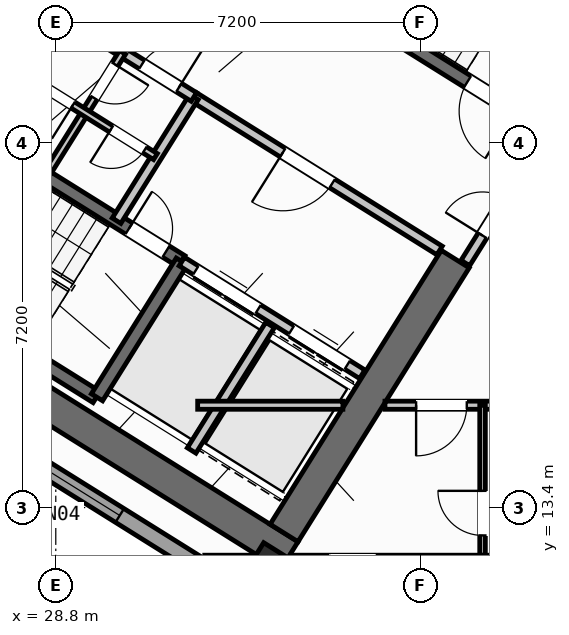
"""IFC4 building model, lengths in metres.
Left out: names, types, materials, properties, quantities, classifications, styles, units other than length and angle.
Written with IfcOpenShell. Run it as: python <this file> out.ifc"""

import sys

from ifc_helpers import new_model, si_unit, direction, frame, frame_2d, origin, origin_2d, place, context, subcontext, project, spatial, rectangle, hollow_rectangle, extrude, source, transform, mapped, element, fill, save


model = new_model("IFC4")
c1 = context("Model", 3, precision=1e-05, world=origin(), true_north=direction((0.0, 1.0)))
c2 = subcontext(c1, "Body", "Model", "MODEL_VIEW")
j1 = project(units=[si_unit("LENGTHUNIT", "METRE"), si_unit("PLANEANGLEUNIT", "RADIAN")], contexts=[c1])
p1 = place(None, origin())
s1 = spatial("IfcSite", under=j1, at=p1, CompositionType="ELEMENT")
p2 = place(p1, origin())
s2 = spatial("IfcBuilding", under=s1, at=p2, CompositionType="ELEMENT")
p3 = place(p2, frame((0.0, 0.0, 97.2)))
s3 = spatial("IfcBuildingStorey", under=s2, at=p3, CompositionType="ELEMENT", Elevation=97.2)
p4 = place(p3, frame((33.409, 12.45, 0.0), z_axis=(0.0, 0.0, 1.0), x_axis=(-0.848051132073, 0.529914405721, 0.0)))
e1 = element("IfcWall", 1, at=p4, inside=s3, PredefinedType="SHEAR", context=c2, shape_type="SweptSolid", body=[
    extrude(rectangle(XDim=13.24, YDim=0.65, at=frame_2d((6.62, 0.0))), origin(), (0.0, 0.0, 1.0), 3.32),
])
p5 = place(p3, frame((36.683, 18.304, 0.0), z_axis=(0.0, 0.0, 1.0), x_axis=(-0.529899109053, -0.848060690178, 0.0)))
e2 = element("IfcWall", 2, at=p5, inside=s3, PredefinedType="SHEAR", context=c2, shape_type="SweptSolid", body=[
    extrude(rectangle(XDim=6.375, YDim=0.65, at=frame_2d((3.188, 0.0))), origin(), (0.0, 0.0, 1.0), 3.32),
])
m1 = source(origin(), c2, "Body", "SweptSolid", [
    extrude(hollow_rectangle(XDim=0.9, YDim=0.9, WallThickness=0.036, at=origin_2d()), origin(), (0.0, 0.0, 1.0), 3.6),
])
p6 = place(p3, frame((33.046, 12.087, 0.0), z_axis=(0.0, 0.0, 1.0), x_axis=(-0.848048096156, 0.529919264233, 0.0)))
e3 = element("IfcColumn", 3, at=p6, inside=s3, PredefinedType="COLUMN", context=c2, shape_type="MappedRepresentation", body=[
    mapped(m1, transform((0.0, 0.0, 0.0), scale=1.0)),
])
p7 = place(p3, frame((31.76, 12.183, 0.0), z_axis=(0.0, 0.0, 1.0), x_axis=(-0.848047074256, 0.529920899612, 0.0)))
e4 = element("IfcWall", 4, at=p7, inside=s3, PredefinedType="STANDARD", context=c2, shape_type="SweptSolid", body=[
    extrude(rectangle(XDim=30.652, YDim=0.32, at=frame_2d((15.326, 0.0))), origin(), (0.0, 0.0, 1.0), 3.32),
])
p8 = place(p7, frame((15.153, 0.0, 0.0)))
e5 = element("IfcOpeningElement", 5, at=p8, cuts=e4, PredefinedType="OPENING", context=c2, shape_type="SweptSolid", body=[
    extrude(rectangle(XDim=1.2, YDim=2.15, at=frame_2d((0.6, 1.075))), frame((0.0, 0.17, 0.0), z_axis=(0.0, -1.0, 0.0), x_axis=(1.0, 0.0, 0.0)), (0.0, 0.0, 1.0), 0.34),
])
p9 = place(p7, frame((2.002, 0.0, 0.8)))
e6 = element("IfcOpeningElement", 6, at=p9, cuts=e4, PredefinedType="OPENING", context=c2, shape_type="SweptSolid", body=[
    extrude(rectangle(XDim=2.1, YDim=1.55, at=frame_2d((1.05, 0.775))), frame((0.0, 0.17, 0.0), z_axis=(0.0, -1.0, 0.0), x_axis=(1.0, 0.0, 0.0)), (0.0, 0.0, 1.0), 0.34),
])
p10 = place(p7, frame((7.206, 0.0, 0.8)))
e7 = element("IfcOpeningElement", 7, at=p10, cuts=e4, PredefinedType="OPENING", context=c2, shape_type="SweptSolid", body=[
    extrude(rectangle(XDim=2.1, YDim=1.55, at=frame_2d((1.05, 0.775))), frame((0.0, 0.17, 0.0), z_axis=(0.0, -1.0, 0.0), x_axis=(1.0, 0.0, 0.0)), (0.0, 0.0, 1.0), 0.34),
])
p11 = place(p7, frame((12.648, 0.0, 1.0)))
e8 = element("IfcOpeningElement", 8, at=p11, cuts=e4, PredefinedType="OPENING", context=c2, shape_type="SweptSolid", body=[
    extrude(rectangle(XDim=0.9, YDim=1.25, at=frame_2d((0.45, 0.625))), frame((0.0, 0.17, 0.0), z_axis=(0.0, -1.0, 0.0), x_axis=(1.0, 0.0, 0.0)), (0.0, 0.0, 1.0), 0.34),
])
p12 = place(p7, frame((27.974, 0.0, 0.95)))
e9 = element("IfcOpeningElement", 9, at=p12, cuts=e4, PredefinedType="OPENING", context=c2, shape_type="SweptSolid", body=[
    extrude(rectangle(XDim=1.2, YDim=1.4, at=frame_2d((0.6, 0.7))), frame((0.0, 0.17, 0.0), z_axis=(0.0, -1.0, 0.0), x_axis=(1.0, 0.0, 0.0)), (0.0, 0.0, 1.0), 0.34),
])
p13 = place(p7, frame((18.347, 0.0, 1.0)))
e10 = element("IfcOpeningElement", 10, at=p13, cuts=e4, PredefinedType="OPENING", context=c2, shape_type="SweptSolid", body=[
    extrude(rectangle(XDim=0.9, YDim=1.25, at=frame_2d((0.45, 0.625))), frame((0.0, 0.17, 0.0), z_axis=(0.0, -1.0, 0.0), x_axis=(1.0, 0.0, 0.0)), (0.0, 0.0, 1.0), 0.34),
])
p14 = place(p7, frame((20.931, 0.0, 1.0)))
e11 = element("IfcOpeningElement", 11, at=p14, cuts=e4, PredefinedType="OPENING", context=c2, shape_type="SweptSolid", body=[
    extrude(rectangle(XDim=0.65, YDim=1.15, at=frame_2d((0.325, 0.575))), frame((0.0, 0.17, 0.0), z_axis=(0.0, -1.0, 0.0), x_axis=(1.0, 0.0, 0.0)), (0.0, 0.0, 1.0), 0.34),
])
p15 = place(p7, frame((22.938, 0.0, 1.0)))
e12 = element("IfcOpeningElement", 12, at=p15, cuts=e4, PredefinedType="OPENING", context=c2, shape_type="SweptSolid", body=[
    extrude(rectangle(XDim=0.9, YDim=1.25, at=frame_2d((0.45, 0.625))), frame((0.0, 0.17, 0.0), z_axis=(0.0, -1.0, 0.0), x_axis=(1.0, 0.0, 0.0)), (0.0, 0.0, 1.0), 0.34),
])
p16 = place(p7, frame((25.069, 0.0, 1.0)))
e13 = element("IfcOpeningElement", 13, at=p16, cuts=e4, PredefinedType="OPENING", context=c2, shape_type="SweptSolid", body=[
    extrude(rectangle(XDim=0.9, YDim=1.25, at=frame_2d((0.45, 0.625))), frame((0.0, 0.17, 0.0), z_axis=(0.0, -1.0, 0.0), x_axis=(1.0, 0.0, 0.0)), (0.0, 0.0, 1.0), 0.34),
])
p17 = place(p3, frame((29.605, 15.581, 0.0), z_axis=(0.0, 0.0, 1.0), x_axis=(-0.848036911448, 0.529937163087, 0.0)))
e14 = element("IfcWall", 14, at=p17, inside=s3, PredefinedType="SHEAR", context=c2, shape_type="SweptSolid", body=[
    extrude(rectangle(XDim=7.46, YDim=0.26, at=frame_2d((3.73, 0.0))), origin(), (0.0, 0.0, 1.0), 3.32),
])
p18 = place(p3, frame((31.28, 18.261, 0.0), z_axis=(0.0, 0.0, 1.0), x_axis=(-0.848051618787, 0.529913626805, 0.0)))
e15 = element("IfcWall", 15, at=p18, inside=s3, PredefinedType="SHEAR", context=c2, shape_type="SweptSolid", body=[
    extrude(rectangle(XDim=7.46, YDim=0.26, at=frame_2d((3.73, 0.0))), origin(), (0.0, 0.0, 1.0), 3.32),
])
p19 = place(p18, frame((0.36, 0.0, 0.0)))
e16 = element("IfcOpeningElement", 16, at=p19, cuts=e15, PredefinedType="OPENING", context=c2, shape_type="SweptSolid", body=[
    extrude(rectangle(XDim=0.86, YDim=2.05, at=frame_2d((0.43, 1.025))), frame((0.0, 0.14, 0.0), z_axis=(0.0, -1.0, 0.0), x_axis=(1.0, 0.0, 0.0)), (0.0, 0.0, 1.0), 0.28),
])
p20 = place(p3, frame((31.288, 18.256, 0.0), z_axis=(0.0, 0.0, 1.0), x_axis=(-0.529943379326, -0.848033026897, 0.0)))
e17 = element("IfcWall", 17, at=p20, inside=s3, PredefinedType="SHEAR", context=c2, shape_type="SweptSolid", body=[
    extrude(rectangle(XDim=3.16, YDim=0.26, at=frame_2d((1.58, 0.0))), origin(), (0.0, 0.0, 1.0), 3.32),
])
p21 = place(p3, frame((38.046, 21.108, 0.0), z_axis=(0.0, 0.0, 1.0), x_axis=(-0.848054434086, 0.529909121291, 0.0)))
e18 = element("IfcWall", 18, at=p21, inside=s3, PredefinedType="SHEAR", context=c2, shape_type="SweptSolid", body=[
    extrude(rectangle(XDim=7.33, YDim=0.26, at=frame_2d((3.665, 0.0))), origin(), (0.0, 0.0, 1.0), 3.32),
])
p22 = place(p21, frame((0.22, 0.0, 0.0)))
e19 = element("IfcOpeningElement", 19, at=p22, cuts=e18, PredefinedType="OPENING", context=c2, shape_type="SweptSolid", body=[
    extrude(rectangle(XDim=1.1, YDim=2.1, at=frame_2d((0.55, 1.05))), frame((0.0, 0.14, 0.0), z_axis=(0.0, -1.0, 0.0), x_axis=(1.0, 0.0, 0.0)), (0.0, 0.0, 1.0), 0.28),
])
p23 = place(p3, frame((34.848, 16.031, 0.0), z_axis=(0.0, 0.0, 1.0), x_axis=(-0.848044042236, 0.529925751807, 0.0)))
e20 = element("IfcWall", 20, at=p23, inside=s3, PredefinedType="STANDARD", context=c2, shape_type="SweptSolid", body=[
    extrude(rectangle(XDim=4.198, YDim=0.2, at=frame_2d((2.099, 0.0))), origin(), (0.0, 0.0, 1.0), 3.31),
])
p24 = place(p23, frame((0.348, 0.0, 0.0)))
e21 = element("IfcOpeningElement", 21, at=p24, cuts=e20, PredefinedType="OPENING", context=c2, shape_type="SweptSolid", body=[
    extrude(rectangle(XDim=1.3, YDim=2.2, at=frame_2d((0.65, 1.1))), frame((0.0, 0.11, 0.0), z_axis=(0.0, -1.0, 0.0), x_axis=(1.0, 0.0, 0.0)), (0.0, 0.0, 1.0), 0.22),
])
p25 = place(p23, frame((2.423, 0.0, 0.0)))
e22 = element("IfcOpeningElement", 22, at=p25, cuts=e20, PredefinedType="OPENING", context=c2, shape_type="SweptSolid", body=[
    extrude(rectangle(XDim=1.45, YDim=2.25, at=frame_2d((0.725, 1.125))), frame((0.0, 0.11, 0.0), z_axis=(0.0, -1.0, 0.0), x_axis=(1.0, 0.0, 0.0)), (0.0, 0.0, 1.0), 0.22),
])
p26 = place(p3, frame((36.374, 18.474, 0.0), z_axis=(0.0, 0.0, 1.0), x_axis=(-0.848051071577, 0.529914502535, 0.0)))
e23 = element("IfcWall", 23, at=p26, inside=s3, PredefinedType="STANDARD", context=c2, shape_type="SweptSolid", body=[
    extrude(rectangle(XDim=5.718, YDim=0.2, at=frame_2d((2.859, 0.0))), origin(), (0.0, 0.0, 1.0), 3.31),
])
p27 = place(p26, frame((2.498, 0.0, 0.0)))
e24 = element("IfcOpeningElement", 24, at=p27, cuts=e23, PredefinedType="OPENING", context=c2, shape_type="SweptSolid", body=[
    extrude(rectangle(XDim=1.15, YDim=2.1, at=frame_2d((0.575, 1.05))), frame((0.0, 0.11, 0.0), z_axis=(0.0, -1.0, 0.0), x_axis=(1.0, 0.0, 0.0)), (0.0, 0.0, 1.0), 0.22),
])
p28 = place(p3, frame((33.029, 17.003, 0.0), z_axis=(0.0, 0.0, 1.0), x_axis=(-0.529916267533, -0.848049968695, 0.0)))
e25 = element("IfcWall", 25, at=p28, inside=s3, PredefinedType="STANDARD", context=c2, shape_type="SweptSolid", body=[
    extrude(rectangle(XDim=2.92, YDim=0.2, at=frame_2d((1.46, 0.0))), origin(), (0.0, 0.0, 1.0), 3.31),
])
for number, where, z_axis, x_axis in (
    (26, (31.525, 21.504, 0.0), (0.0, 0.0, 1.0), (-0.53, -0.848, 0.0)),
    (27, (28.71, 23.263, 0.0), (0.0, 0.0, 1.0), (-0.53, -0.848, 0.0)),
):
    element("IfcWall", number, at=place(p3, frame(where, z_axis=z_axis, x_axis=x_axis)), inside=s3, PredefinedType="STANDARD", context=c2, shape_type="SweptSolid", body=[
        extrude(rectangle(XDim=2.88, YDim=0.2, at=frame_2d((1.44, 0.0))), origin(), (0.0, 0.0, 1.0), 3.31),
    ])
p29 = place(p3, frame((31.525, 21.504, 0.0), z_axis=(0.0, 0.0, 1.0), x_axis=(-0.848044998614, 0.529924221305, 0.0)))
e28 = element("IfcWall", 28, at=p29, inside=s3, PredefinedType="STANDARD", context=c2, shape_type="SweptSolid", body=[
    extrude(rectangle(XDim=6.168, YDim=0.2, at=frame_2d((3.084, 0.0))), origin(), (0.0, 0.0, 1.0), 3.31),
])
p30 = place(p29, frame((4.4, 0.0, 0.0)))
e29 = element("IfcOpeningElement", 29, at=p30, cuts=e28, PredefinedType="OPENING", context=c2, shape_type="SweptSolid", body=[
    extrude(rectangle(XDim=0.86, YDim=2.05, at=frame_2d((0.43, 1.025))), frame((0.0, 0.11, 0.0), z_axis=(0.0, -1.0, 0.0), x_axis=(1.0, 0.0, 0.0)), (0.0, 0.0, 1.0), 0.22),
])
p31 = place(p29, frame((0.35, 0.0, 0.0)))
e30 = element("IfcOpeningElement", 30, at=p31, cuts=e28, PredefinedType="OPENING", context=c2, shape_type="SweptSolid", body=[
    extrude(rectangle(XDim=0.86, YDim=2.05, at=frame_2d((0.43, 1.025))), frame((0.0, 0.11, 0.0), z_axis=(0.0, -1.0, 0.0), x_axis=(1.0, 0.0, 0.0)), (0.0, 0.0, 1.0), 0.22),
])
p32 = place(p3, frame((30.117, 22.384, 0.0), z_axis=(0.0, 0.0, 1.0), x_axis=(-0.529951914384, -0.848027693204, 0.0)))
e31 = element("IfcWall", 31, at=p32, inside=s3, PredefinedType="PLUMBINGWALL", context=c2, shape_type="SweptSolid", body=[
    extrude(rectangle(XDim=1.4, YDim=0.14, at=frame_2d((0.7, 0.0))), origin(), (0.0, 0.0, 1.0), 3.31),
])
p33 = place(p32, frame((0.28, 0.0, 0.0)))
e32 = element("IfcOpeningElement", 32, at=p33, cuts=e31, PredefinedType="OPENING", context=c2, shape_type="SweptSolid", body=[
    extrude(rectangle(XDim=0.78, YDim=2.05, at=frame_2d((0.39, 1.025))), frame((0.0, 0.08, 0.0), z_axis=(0.0, -1.0, 0.0), x_axis=(1.0, 0.0, 0.0)), (0.0, 0.0, 1.0), 0.16),
])
p34 = place(p3, frame((29.375, 21.196, 0.0), z_axis=(0.0, 0.0, 1.0), x_axis=(-0.529865479138, -0.848081702443, 0.0)))
e33 = element("IfcWall", 33, at=p34, inside=s3, PredefinedType="PLUMBINGWALL", context=c2, shape_type="SweptSolid", body=[
    extrude(rectangle(XDim=1.48, YDim=0.14, at=frame_2d((0.74, 0.0))), origin(), (0.0, 0.0, 1.0), 3.31),
])
p35 = place(p3, frame((30.766, 20.327, 0.0), z_axis=(0.0, 0.0, 1.0), x_axis=(-0.848052663127, 0.529911955482, 0.0)))
e34 = element("IfcWall", 34, at=p35, inside=s3, PredefinedType="PLUMBINGWALL", context=c2, shape_type="SweptSolid", body=[
    extrude(rectangle(XDim=3.28, YDim=0.14, at=frame_2d((1.64, 0.0))), origin(), (0.0, 0.0, 1.0), 3.31),
])
p36 = place(p35, frame((0.25, 0.0, 0.0)))
e35 = element("IfcOpeningElement", 35, at=p36, cuts=e34, PredefinedType="OPENING", context=c2, shape_type="SweptSolid", body=[
    extrude(rectangle(XDim=0.78, YDim=2.05, at=frame_2d((0.39, 1.025))), frame((0.0, 0.08, 0.0), z_axis=(0.0, -1.0, 0.0), x_axis=(1.0, 0.0, 0.0)), (0.0, 0.0, 1.0), 0.16),
])
p37 = place(p35, frame((1.92, 0.0, 0.0)))
e36 = element("IfcOpeningElement", 36, at=p37, cuts=e34, PredefinedType="OPENING", context=c2, shape_type="SweptSolid", body=[
    extrude(rectangle(XDim=0.78, YDim=2.05, at=frame_2d((0.39, 1.025))), frame((0.0, 0.08, 0.0), z_axis=(0.0, -1.0, 0.0), x_axis=(1.0, 0.0, 0.0)), (0.0, 0.0, 1.0), 0.16),
])
p38 = place(p3, frame((38.451, 20.737, 0.0), z_axis=(0.0, 0.0, 1.0), x_axis=(-0.529924799939, -0.848044637038, 0.0)))
e37 = element("IfcWall", 37, at=p38, inside=s3, PredefinedType="STANDARD", context=c2, shape_type="SweptSolid", body=[
    extrude(rectangle(XDim=2.96, YDim=0.2, at=frame_2d((1.48, 0.0))), origin(), (0.0, 0.0, 1.0), 3.31),
])
p39 = place(p38, frame((1.46, 0.0, 0.0)))
e38 = element("IfcOpeningElement", 38, at=p39, cuts=e37, PredefinedType="OPENING", context=c2, shape_type="SweptSolid", body=[
    extrude(rectangle(XDim=0.86, YDim=2.05, at=frame_2d((0.43, 1.025))), frame((0.0, 0.11, 0.0), z_axis=(0.0, -1.0, 0.0), x_axis=(1.0, 0.0, 0.0)), (0.0, 0.0, 1.0), 0.22),
])
p40 = place(p3, frame((31.6, 15.42, 0.0), z_axis=(0.0, 0.0, 1.0), x_axis=(1.0, 0.0, 0.0)))
e39 = element("IfcWall", 39, at=p40, inside=s3, PredefinedType="PARTITIONING", context=c2, shape_type="SweptSolid", body=[
    extrude(rectangle(XDim=2.866, YDim=0.16, at=frame_2d((1.433, 0.0))), origin(), (0.0, 0.0, 1.0), 3.31),
])
p41 = place(p3, frame((35.296, 15.42, 0.0), z_axis=(0.0, 0.0, 1.0), x_axis=(1.0, 0.0, 0.0)))
e40 = element("IfcWall", 40, at=p41, inside=s3, PredefinedType="PARTITIONING", context=c2, shape_type="SweptSolid", body=[
    extrude(rectangle(XDim=15.311, YDim=0.16, at=frame_2d((7.655, 0.0))), origin(), (0.0, 0.0, 1.0), 3.31),
])
p42 = place(p41, frame((0.615, 0.0, 0.0)))
e41 = element("IfcOpeningElement", 41, at=p42, cuts=e40, PredefinedType="OPENING", context=c2, shape_type="SweptSolid", body=[
    extrude(rectangle(XDim=1.0, YDim=2.1, at=frame_2d((0.5, 1.05))), frame((0.0, 0.09, 0.0), z_axis=(0.0, -1.0, 0.0), x_axis=(1.0, 0.0, 0.0)), (0.0, 0.0, 1.0), 0.18),
])
p43 = place(p41, frame((9.035, 0.0, 0.0)))
e42 = element("IfcOpeningElement", 42, at=p43, cuts=e40, PredefinedType="OPENING", context=c2, shape_type="SweptSolid", body=[
    extrude(rectangle(XDim=1.0, YDim=2.1, at=frame_2d((0.5, 1.05))), frame((0.0, 0.09, 0.0), z_axis=(0.0, -1.0, 0.0), x_axis=(1.0, 0.0, 0.0)), (0.0, 0.0, 1.0), 0.18),
])
p44 = place(p3, frame((37.222, 1.96, 0.0), z_axis=(0.0, 0.0, 1.0), x_axis=(0.0, 1.0, 0.0)))
e43 = element("IfcWall", 43, at=p44, inside=s3, PredefinedType="PARTITIONING", context=c2, shape_type="SweptSolid", body=[
    extrude(rectangle(XDim=13.46, YDim=0.11, at=frame_2d((6.73, 0.0))), origin(), (0.0, 0.0, 1.0), 3.31),
])
p45 = place(p44, frame((5.2, 0.0, 0.0)))
e44 = element("IfcOpeningElement", 44, at=p45, cuts=e43, PredefinedType="OPENING", context=c2, shape_type="SweptSolid", body=[
    extrude(rectangle(XDim=0.92, YDim=2.08, at=frame_2d((0.46, 1.04))), frame((0.0, 0.065, 0.0), z_axis=(0.0, -1.0, 0.0), x_axis=(1.0, 0.0, 0.0)), (0.0, 0.0, 1.0), 0.13),
])
p46 = place(p44, frame((10.89, 0.0, 0.0)))
e45 = element("IfcOpeningElement", 45, at=p46, cuts=e43, PredefinedType="OPENING", context=c2, shape_type="SweptSolid", body=[
    extrude(rectangle(XDim=0.88, YDim=2.08, at=frame_2d((0.44, 1.04))), frame((0.0, 0.065, 0.0), z_axis=(0.0, -1.0, 0.0), x_axis=(1.0, 0.0, 0.0)), (0.0, 0.0, 1.0), 0.13),
])
m2 = source(origin(), c2, "Body", "SweptSolid", [
    extrude(rectangle(XDim=2.1, YDim=1.55, at=frame_2d((1.05, 0.775))), frame((0.0, 0.03, 0.0), z_axis=(0.0, -1.0, 0.0), x_axis=(1.0, 0.0, 0.0)), (0.0, 0.0, 1.0), 0.06),
])
p47 = place(p9, origin())
e46 = element("IfcWindow", 46, at=p47, inside=s3, PartitioningType="SINGLE_PANEL", PredefinedType="WINDOW", context=c2, shape_type="MappedRepresentation", body=[
    mapped(m2, transform((0.0, 0.0, 0.0), scale=1.0)),
])
fill(e6, e46)
m3 = source(origin(), c2, "Body", "SweptSolid", [
    extrude(rectangle(XDim=0.86, YDim=2.05, at=frame_2d((0.43, 1.025))), frame((0.0, 0.025, 0.0), z_axis=(0.0, -1.0, 0.0), x_axis=(1.0, 0.0, 0.0)), (0.0, 0.0, 1.0), 0.05),
])
p48 = place(p19, frame((0.86, 0.0, 0.0), z_axis=(0.0, 0.0, 1.0), x_axis=(-1.0, 0.0, 0.0)))
e47 = element("IfcDoor", 47, at=p48, inside=s3, OperationType="SINGLE_SWING_LEFT", PredefinedType="DOOR", context=c2, shape_type="MappedRepresentation", body=[
    mapped(m3, transform((0.0, 0.0, 0.0), scale=1.0)),
])
fill(e16, e47)
m4 = source(origin(), c2, "Body", "SweptSolid", [
    extrude(rectangle(XDim=1.1, YDim=2.1, at=frame_2d((0.55, 1.05))), frame((0.0, 0.025, 0.0), z_axis=(0.0, -1.0, 0.0), x_axis=(1.0, 0.0, 0.0)), (0.0, 0.0, 1.0), 0.05),
])
p49 = place(p22, origin())
e48 = element("IfcDoor", 48, at=p49, inside=s3, OperationType="SINGLE_SWING_LEFT", PredefinedType="DOOR", context=c2, shape_type="MappedRepresentation", body=[
    mapped(m4, transform((0.0, 0.0, 0.0), scale=1.0)),
])
fill(e19, e48)
m5 = source(origin(), c2, "Body", "SweptSolid", [
    extrude(rectangle(XDim=1.15, YDim=2.1, at=frame_2d((0.575, 1.05))), frame((0.0, 0.025, 0.0), z_axis=(0.0, -1.0, 0.0), x_axis=(1.0, 0.0, 0.0)), (0.0, 0.0, 1.0), 0.05),
])
p50 = place(p27, origin())
e49 = element("IfcDoor", 49, at=p50, inside=s3, OperationType="SINGLE_SWING_RIGHT", PredefinedType="DOOR", context=c2, shape_type="MappedRepresentation", body=[
    mapped(m5, transform((0.0, 0.0, 0.0), scale=1.0)),
])
fill(e24, e49)
m6 = source(origin(), c2, "Body", "SweptSolid", [
    extrude(rectangle(XDim=1.3, YDim=2.2, at=frame_2d((0.65, 1.1))), frame((0.0, 0.025, 0.0), z_axis=(0.0, -1.0, 0.0), x_axis=(1.0, 0.0, 0.0)), (0.0, 0.0, 1.0), 0.05),
])
p51 = place(p24, origin())
e50 = element("IfcDoor", 50, at=p51, inside=s3, OperationType="DOUBLE_DOOR_SLIDING", PredefinedType="DOOR", context=c2, shape_type="MappedRepresentation", body=[
    mapped(m6, transform((0.0, 0.0, 0.0), scale=1.0)),
])
fill(e21, e50)
m7 = source(origin(), c2, "Body", "SweptSolid", [
    extrude(rectangle(XDim=1.45, YDim=2.25, at=frame_2d((0.725, 1.125))), frame((0.0, 0.025, 0.0), z_axis=(0.0, -1.0, 0.0), x_axis=(1.0, 0.0, 0.0)), (0.0, 0.0, 1.0), 0.05),
])
p52 = place(p25, origin())
e51 = element("IfcDoor", 51, at=p52, inside=s3, OperationType="DOUBLE_DOOR_SLIDING", PredefinedType="DOOR", context=c2, shape_type="MappedRepresentation", body=[
    mapped(m7, transform((0.0, 0.0, 0.0), scale=1.0)),
])
fill(e22, e51)
p53 = place(p31, frame((0.86, 0.0, 0.0), z_axis=(0.0, 0.0, 1.0), x_axis=(-1.0, 0.0, 0.0)))
e52 = element("IfcDoor", 52, at=p53, inside=s3, OperationType="SINGLE_SWING_RIGHT", PredefinedType="DOOR", context=c2, shape_type="MappedRepresentation", body=[
    mapped(m3, transform((0.0, 0.0, 0.0), scale=1.0)),
])
fill(e30, e52)
m8 = source(origin(), c2, "Body", "SweptSolid", [
    extrude(rectangle(XDim=0.78, YDim=2.05, at=frame_2d((0.39, 1.025))), frame((0.0, 0.025, 0.0), z_axis=(0.0, -1.0, 0.0), x_axis=(1.0, 0.0, 0.0)), (0.0, 0.0, 1.0), 0.05),
])
p54 = place(p33, origin())
e53 = element("IfcDoor", 53, at=p54, inside=s3, OperationType="SINGLE_SWING_LEFT", PredefinedType="DOOR", context=c2, shape_type="MappedRepresentation", body=[
    mapped(m8, transform((0.0, 0.0, 0.0), scale=1.0)),
])
fill(e32, e53)
p55 = place(p36, origin())
e54 = element("IfcDoor", 54, at=p55, inside=s3, OperationType="SINGLE_SWING_RIGHT", PredefinedType="DOOR", context=c2, shape_type="MappedRepresentation", body=[
    mapped(m8, transform((0.0, 0.0, 0.0), scale=1.0)),
])
fill(e35, e54)
p56 = place(p37, origin())
e55 = element("IfcDoor", 55, at=p56, inside=s3, OperationType="SINGLE_SWING_LEFT", PredefinedType="DOOR", context=c2, shape_type="MappedRepresentation", body=[
    mapped(m8, transform((0.0, 0.0, 0.0), scale=1.0)),
])
fill(e36, e55)
p57 = place(p39, frame((0.86, 0.0, 0.0), z_axis=(0.0, 0.0, 1.0), x_axis=(-1.0, 0.0, 0.0)))
e56 = element("IfcDoor", 56, at=p57, inside=s3, OperationType="SINGLE_SWING_LEFT", PredefinedType="DOOR", context=c2, shape_type="MappedRepresentation", body=[
    mapped(m3, transform((0.0, 0.0, 0.0), scale=1.0)),
])
fill(e38, e56)
m9 = source(origin(), c2, "Body", "SweptSolid", [
    extrude(rectangle(XDim=1.0, YDim=2.1, at=frame_2d((0.5, 1.05))), frame((0.0, 0.025, 0.0), z_axis=(0.0, -1.0, 0.0), x_axis=(1.0, 0.0, 0.0)), (0.0, 0.0, 1.0), 0.05),
])
p58 = place(p42, frame((1.0, 0.0, 0.0), z_axis=(0.0, 0.0, 1.0), x_axis=(-1.0, 0.0, 0.0)))
e57 = element("IfcDoor", 57, at=p58, inside=s3, OperationType="SINGLE_SWING_RIGHT", PredefinedType="DOOR", context=c2, shape_type="MappedRepresentation", body=[
    mapped(m9, transform((0.0, 0.0, 0.0), scale=1.0)),
])
fill(e41, e57)
m10 = source(origin(), c2, "Body", "SweptSolid", [
    extrude(rectangle(XDim=0.88, YDim=2.08, at=frame_2d((0.44, 1.04))), frame((0.0, 0.025, 0.0), z_axis=(0.0, -1.0, 0.0), x_axis=(1.0, 0.0, 0.0)), (0.0, 0.0, 1.0), 0.05),
])
p59 = place(p46, origin())
e58 = element("IfcDoor", 58, at=p59, inside=s3, OperationType="SINGLE_SWING_RIGHT", PredefinedType="DOOR", context=c2, shape_type="MappedRepresentation", body=[
    mapped(m10, transform((0.0, 0.0, 0.0), scale=1.0)),
])
fill(e45, e58)
save(model, sys.argv[1])
